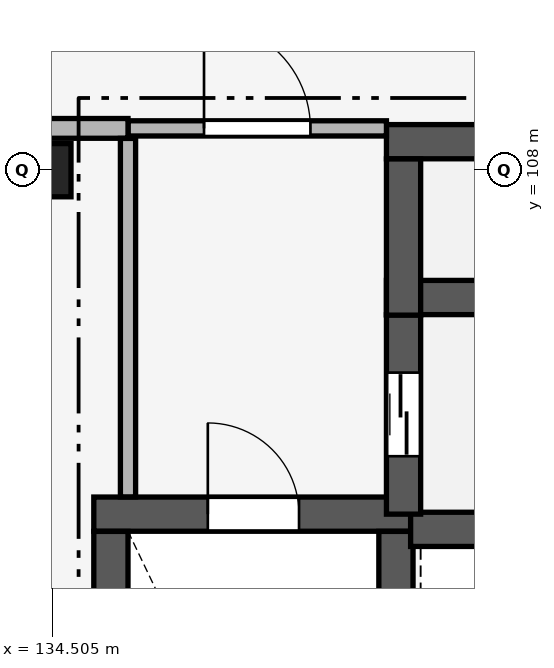
"""IFC4 building model, lengths in metres.
Left out: names, types, materials, properties, quantities, classifications, styles, units other than length and angle.
Written with IfcOpenShell. Run it as: python <this file> out.ifc"""

import sys

from ifc_helpers import new_model, si_unit, direction, frame, frame_2d, origin, origin_2d, place, context, subcontext, project, spatial, rectangle, extrude, element, fill, save


model = new_model("IFC4")
c1 = context("Model", 3, precision=1e-05, world=origin(), true_north=direction((0.0, 1.0)))
c2 = subcontext(c1, "Body", "Model", "MODEL_VIEW")
j1 = project(units=[si_unit("LENGTHUNIT", "METRE"), si_unit("PLANEANGLEUNIT", "RADIAN")], contexts=[c1])
p1 = place(None, origin())
s1 = spatial("IfcSite", under=j1, at=p1, CompositionType="ELEMENT")
p2 = place(p1, origin())
s2 = spatial("IfcBuilding", under=s1, at=p2, CompositionType="ELEMENT")
p3 = place(p2, frame((0.0, 0.0, 33.6)))
s3 = spatial("IfcBuildingStorey", under=s2, at=p3, CompositionType="ELEMENT", Elevation=33.6)
p4 = place(p3, frame((134.4, 108.0, 0.0), z_axis=(0.0, 0.0, 1.0), x_axis=(1.0, 0.0, 0.0)))
e1 = element("IfcColumn", 1, at=p4, inside=s3, PredefinedType="COLUMN", context=c2, shape_type="SweptSolid", body=[
    extrude(rectangle(XDim=0.7, YDim=0.7, at=origin_2d()), origin(), (0.0, 0.0, 1.0), 4.2),
])
p5 = place(p3, frame((135.05, 103.475, 0.0), z_axis=(0.0, 0.0, 1.0), x_axis=(1.0, 0.0, 0.0)))
e2 = element("IfcWall", 2, at=p5, inside=s3, PredefinedType="SHEAR", context=c2, shape_type="SweptSolid", body=[
    extrude(rectangle(XDim=4.2, YDim=0.45, at=frame_2d((2.1, 0.0))), origin(), (0.0, 0.0, 1.0), 3.95),
])
p6 = place(p5, frame((1.5, 0.0, 0.0)))
e3 = element("IfcOpeningElement", 3, at=p6, cuts=e2, PredefinedType="OPENING", context=c2, shape_type="SweptSolid", body=[
    extrude(rectangle(XDim=1.2, YDim=2.2, at=frame_2d((0.6, 1.1))), frame((0.0, 0.24, 0.0), z_axis=(0.0, -1.0, 0.0), x_axis=(1.0, 0.0, 0.0)), (0.0, 0.0, 1.0), 0.48),
])
for number, where, z_axis, x_axis in (
    (4, (135.275, 96.352, 0.0), (0.0, 0.0, 1.0), (0.0, 1.0, 0.0)),
    (5, (139.025, 96.352, 0.0), (0.0, 0.0, 1.0), (0.0, 1.0, 0.0)),
):
    element("IfcWall", number, at=place(p3, frame(where, z_axis=z_axis, x_axis=x_axis)), inside=s3, PredefinedType="SHEAR", context=c2, shape_type="SweptSolid", body=[
        extrude(rectangle(XDim=6.896, YDim=0.45, at=frame_2d((3.448, 0.0))), origin(), (0.0, 0.0, 1.0), 3.95),
    ])
p7 = place(p3, frame((139.218, 103.275, 0.0), z_axis=(0.0, 0.0, 1.0), x_axis=(1.0, 0.0, 0.0)))
e6 = element("IfcWall", 6, at=p7, inside=s3, PredefinedType="SHEAR", context=c2, shape_type="SweptSolid", body=[
    extrude(rectangle(XDim=2.982, YDim=0.45, at=frame_2d((1.491, 0.0))), origin(), (0.0, 0.0, 1.0), 3.95),
])
p8 = place(p3, frame((138.9, 106.325, 0.0), z_axis=(0.0, 0.0, 1.0), x_axis=(1.0, 0.0, 0.0)))
e7 = element("IfcWall", 7, at=p8, inside=s3, PredefinedType="SHEAR", context=c2, shape_type="SweptSolid", body=[
    extrude(rectangle(XDim=3.3, YDim=0.45, at=frame_2d((1.65, 0.0))), origin(), (0.0, 0.0, 1.0), 3.95),
])
p9 = place(p3, frame((139.125, 103.475, 0.0), z_axis=(0.0, 0.0, 1.0), x_axis=(0.0, 1.0, 0.0)))
e8 = element("IfcWall", 8, at=p9, inside=s3, PredefinedType="SHEAR", context=c2, shape_type="SweptSolid", body=[
    extrude(rectangle(XDim=2.623, YDim=0.45, at=frame_2d((1.312, 0.0))), origin(), (0.0, 0.0, 1.0), 3.95),
])
p10 = place(p9, frame((0.762, 0.0, 0.0)))
e9 = element("IfcOpeningElement", 9, at=p10, cuts=e8, PredefinedType="OPENING", context=c2, shape_type="SweptSolid", body=[
    extrude(rectangle(XDim=1.1, YDim=2.15, at=frame_2d((0.55, 1.075))), frame((0.0, 0.24, 0.0), z_axis=(0.0, -1.0, 0.0), x_axis=(1.0, 0.0, 0.0)), (0.0, 0.0, 1.0), 0.48),
])
p11 = place(p3, frame((138.9, 108.375, 0.0), z_axis=(0.0, 0.0, 1.0), x_axis=(1.0, 0.0, 0.0)))
e10 = element("IfcWall", 10, at=p11, inside=s3, PredefinedType="SHEAR", context=c2, shape_type="SweptSolid", body=[
    extrude(rectangle(XDim=3.556, YDim=0.45, at=frame_2d((1.778, 0.0))), origin(), (0.0, 0.0, 1.0), 3.95),
])
p12 = place(p11, frame((1.228, 0.0, 0.0)))
e11 = element("IfcOpeningElement", 11, at=p12, cuts=e10, PredefinedType="OPENING", context=c2, shape_type="SweptSolid", body=[
    extrude(rectangle(XDim=1.1, YDim=2.15, at=frame_2d((0.55, 1.075))), frame((0.0, 0.24, 0.0), z_axis=(0.0, -1.0, 0.0), x_axis=(1.0, 0.0, 0.0)), (0.0, 0.0, 1.0), 0.48),
])
p13 = place(p3, frame((139.125, 106.093, 0.0), z_axis=(0.0, 0.0, 1.0), x_axis=(0.0, 1.0, 0.0)))
e12 = element("IfcWall", 12, at=p13, inside=s3, PredefinedType="SHEAR", context=c2, shape_type="SweptSolid", body=[
    extrude(rectangle(XDim=2.055, YDim=0.45, at=frame_2d((1.027, 0.0))), origin(), (0.0, 0.0, 1.0), 3.95),
])
p14 = place(p3, frame((135.5, 108.55, 0.0), z_axis=(0.0, 0.0, 1.0), x_axis=(1.0, 0.0, 0.0)))
e13 = element("IfcWall", 13, at=p14, inside=s3, PredefinedType="PARTITIONING", context=c2, shape_type="SweptSolid", body=[
    extrude(rectangle(XDim=3.4, YDim=0.2, at=frame_2d((1.7, 0.0))), origin(), (0.0, 0.0, 1.0), 3.95),
])
p15 = place(p14, frame((1.0, 0.0, 0.0)))
e14 = element("IfcOpeningElement", 14, at=p15, cuts=e13, PredefinedType="OPENING", context=c2, shape_type="SweptSolid", body=[
    extrude(rectangle(XDim=1.4, YDim=2.2, at=frame_2d((0.7, 1.1))), frame((0.0, 0.115, 0.0), z_axis=(0.0, -1.0, 0.0), x_axis=(1.0, 0.0, 0.0)), (0.0, 0.0, 1.0), 0.23),
])
p16 = place(p3, frame((134.2, 108.55, 0.0), z_axis=(0.0, 0.0, 1.0), x_axis=(1.0, 0.0, 0.0)))
e15 = element("IfcWall", 15, at=p16, inside=s3, PredefinedType="PARTITIONING", context=c2, shape_type="SweptSolid", body=[
    extrude(rectangle(XDim=1.3, YDim=0.26, at=frame_2d((0.65, 0.0))), origin(), (0.0, 0.0, 1.0), 3.4),
])
p17 = place(p3, frame((135.5, 103.702, 0.0), z_axis=(0.0, 0.0, 1.0), x_axis=(0.0, 1.0, 0.0)))
e16 = element("IfcWall", 16, at=p17, inside=s3, PredefinedType="PARTITIONING", context=c2, shape_type="SweptSolid", body=[
    extrude(rectangle(XDim=4.716, YDim=0.2, at=frame_2d((2.358, 0.0))), origin(), (0.0, 0.0, 1.0), 3.95),
])
p18 = place(p6, origin())
e17 = element("IfcDoor", 17, at=p18, inside=s3, OperationType="SINGLE_SWING_LEFT", PredefinedType="DOOR", context=c2, shape_type="SweptSolid", body=[
    extrude(rectangle(XDim=1.2, YDim=2.2, at=frame_2d((0.6, 1.1))), frame((0.0, 0.025, 0.0), z_axis=(0.0, -1.0, 0.0), x_axis=(1.0, 0.0, 0.0)), (0.0, 0.0, 1.0), 0.05),
])
fill(e3, e17)
p19 = place(p10, origin())
e18 = element("IfcDoor", 18, at=p19, inside=s3, OperationType="DOUBLE_DOOR_SLIDING", PredefinedType="DOOR", context=c2, shape_type="SweptSolid", body=[
    extrude(rectangle(XDim=1.1, YDim=2.15, at=frame_2d((0.55, 1.075))), frame((0.0, 0.025, 0.0), z_axis=(0.0, -1.0, 0.0), x_axis=(1.0, 0.0, 0.0)), (0.0, 0.0, 1.0), 0.05),
])
fill(e9, e18)
p20 = place(p15, origin())
e19 = element("IfcDoor", 19, at=p20, inside=s3, OperationType="SINGLE_SWING_LEFT", PredefinedType="DOOR", context=c2, shape_type="SweptSolid", body=[
    extrude(rectangle(XDim=1.4, YDim=2.2, at=frame_2d((0.7, 1.1))), frame((0.0, 0.025, 0.0), z_axis=(0.0, -1.0, 0.0), x_axis=(1.0, 0.0, 0.0)), (0.0, 0.0, 1.0), 0.05),
])
fill(e14, e19)
save(model, sys.argv[1])
